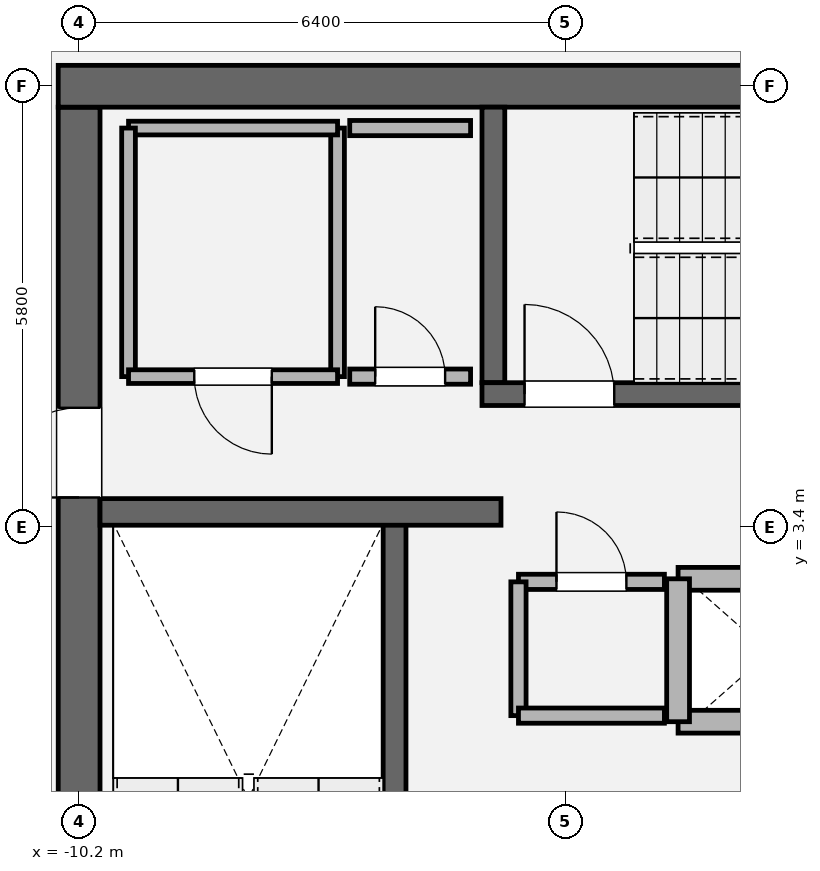
"""IFC4 building model, lengths in metres.
Left out: names, types, materials, properties, quantities, classifications, styles, units other than length and angle.
Written with IfcOpenShell. Run it as: python <this file> out.ifc"""

import sys

from ifc_helpers import new_model, si_unit, direction, frame, frame_2d, origin, place, context, subcontext, project, spatial, rectangle, extrude, element, fill, save


model = new_model("IFC4")
c1 = context("Model", 3, precision=1e-05, world=origin(), true_north=direction((0.0, 1.0)))
c2 = subcontext(c1, "Body", "Model", "MODEL_VIEW")
j1 = project(units=[si_unit("LENGTHUNIT", "METRE"), si_unit("PLANEANGLEUNIT", "RADIAN")], contexts=[c1])
p1 = place(None, origin())
s1 = spatial("IfcSite", under=j1, at=p1, CompositionType="ELEMENT")
p2 = place(p1, origin())
s2 = spatial("IfcBuilding", under=s1, at=p2, CompositionType="ELEMENT")
p3 = place(p2, frame((0.0, 0.0, 271.65)))
s3 = spatial("IfcBuildingStorey", under=s2, at=p3, CompositionType="ELEMENT", Elevation=271.65)
p4 = place(p3, frame((-10.2, -8.925, 0.0), z_axis=(0.0, 0.0, 1.0), x_axis=(0.0, 1.0, 0.0)))
e1 = element("IfcWall", 1, at=p4, inside=s3, PredefinedType="SHEAR", context=c2, shape_type="SweptSolid", body=[
    extrude(rectangle(XDim=17.85, YDim=0.55, at=frame_2d((8.925, 0.0))), origin(), (0.0, 0.0, 1.0), 4.05),
])
p5 = place(p4, frame((12.715, 0.0, 0.0)))
e2 = element("IfcOpeningElement", 2, at=p5, cuts=e1, PredefinedType="OPENING", context=c2, shape_type="SweptSolid", body=[
    extrude(rectangle(XDim=1.18, YDim=2.2, at=frame_2d((0.59, 1.1))), frame((0.0, 0.285, 0.0), z_axis=(0.0, -1.0, 0.0), x_axis=(1.0, 0.0, 0.0)), (0.0, 0.0, 1.0), 0.57),
])
p6 = place(p3, frame((-10.475, 9.2, 0.0), z_axis=(0.0, 0.0, 1.0), x_axis=(1.0, 0.0, 0.0)))
e3 = element("IfcWall", 3, at=p6, inside=s3, PredefinedType="SHEAR", context=c2, shape_type="SweptSolid", body=[
    extrude(rectangle(XDim=20.95, YDim=0.55, at=frame_2d((10.475, 0.0))), origin(), (0.0, 0.0, 1.0), 4.05),
])
p7 = place(p3, frame((-6.05, -5.5, 0.0), z_axis=(0.0, 0.0, 1.0), x_axis=(0.0, 1.0, 0.0)))
e4 = element("IfcWall", 4, at=p7, inside=s3, PredefinedType="SOLIDWALL", context=c2, shape_type="SweptSolid", body=[
    extrude(rectangle(XDim=8.95, YDim=0.3, at=frame_2d((4.475, 0.0))), origin(), (0.0, 0.0, 1.0), 4.05),
])
p8 = place(p3, frame((-4.75, 5.3, 0.0), z_axis=(0.0, 0.0, 1.0), x_axis=(0.0, 1.0, 0.0)))
e5 = element("IfcWall", 5, at=p8, inside=s3, PredefinedType="SOLIDWALL", context=c2, shape_type="SweptSolid", body=[
    extrude(rectangle(XDim=3.625, YDim=0.3, at=frame_2d((1.812, 0.0))), origin(), (0.0, 0.0, 1.0), 4.05),
])
p9 = place(p3, frame((-4.9, 5.15, 0.0), z_axis=(0.0, 0.0, 1.0), x_axis=(1.0, 0.0, 0.0)))
e6 = element("IfcWall", 6, at=p9, inside=s3, PredefinedType="SOLIDWALL", context=c2, shape_type="SweptSolid", body=[
    extrude(rectangle(XDim=9.8, YDim=0.3, at=frame_2d((4.9, 0.0))), origin(), (0.0, 0.0, 1.0), 4.05),
])
p10 = place(p9, frame((0.56, 0.0, 0.0)))
e7 = element("IfcOpeningElement", 7, at=p10, cuts=e6, PredefinedType="OPENING", context=c2, shape_type="SweptSolid", body=[
    extrude(rectangle(XDim=1.18, YDim=2.2, at=frame_2d((0.59, 1.1))), frame((0.0, 0.16, 0.0), z_axis=(0.0, -1.0, 0.0), x_axis=(1.0, 0.0, 0.0)), (0.0, 0.0, 1.0), 0.32),
])
p11 = place(p3, frame((-9.925, 3.6, 0.0), z_axis=(0.0, 0.0, 1.0), x_axis=(1.0, 0.0, 0.0)))
e8 = element("IfcWall", 8, at=p11, inside=s3, PredefinedType="SOLIDWALL", context=c2, shape_type="SweptSolid", body=[
    extrude(rectangle(XDim=5.275, YDim=0.35, at=frame_2d((2.638, 0.0))), origin(), (0.0, 0.0, 1.0), 4.05),
])
for number, where, z_axis, x_axis in (
    (9, (-2.32, 0.84, 0.0), (0.0, 0.0, 1.0), (1.0, 0.0, 0.0)),
    (10, (-2.32, 2.72, 0.0), (0.0, 0.0, 1.0), (1.0, 0.0, 0.0)),
):
    element("IfcWall", number, at=place(p3, frame(where, z_axis=z_axis, x_axis=x_axis)), inside=s3, PredefinedType="SOLIDWALL", context=c2, shape_type="SweptSolid", body=[
        extrude(rectangle(XDim=4.64, YDim=0.3, at=frame_2d((2.32, 0.0))), origin(), (0.0, 0.0, 1.0), 3.85),
    ])
p12 = place(p3, frame((-2.32, 0.84, 0.0), z_axis=(0.0, 0.0, 1.0), x_axis=(0.0, 1.0, 0.0)))
e11 = element("IfcWall", 11, at=p12, inside=s3, PredefinedType="SOLIDWALL", context=c2, shape_type="SweptSolid", body=[
    extrude(rectangle(XDim=1.88, YDim=0.3, at=frame_2d((0.94, 0.0))), origin(), (0.0, 0.0, 1.0), 3.85),
])
p13 = place(p3, frame((-2.5, 2.68, 0.0), z_axis=(0.0, 0.0, 1.0), x_axis=(-1.0, 0.0, 0.0)))
e12 = element("IfcWall", 12, at=p13, inside=s3, PredefinedType="SOLIDWALL", context=c2, shape_type="SweptSolid", body=[
    extrude(rectangle(XDim=1.92, YDim=0.2, at=frame_2d((0.96, 0.0))), origin(), (0.0, 0.0, 1.0), 3.85),
])
p14 = place(p13, frame((0.5, 0.0, 0.0)))
e13 = element("IfcOpeningElement", 13, at=p14, cuts=e12, PredefinedType="OPENING", context=c2, shape_type="SweptSolid", body=[
    extrude(rectangle(XDim=0.92, YDim=2.1, at=frame_2d((0.46, 1.05))), frame((0.0, 0.11, 0.0), z_axis=(0.0, -1.0, 0.0), x_axis=(1.0, 0.0, 0.0)), (0.0, 0.0, 1.0), 0.22),
])
p15 = place(p3, frame((-4.42, 2.68, 0.0), z_axis=(0.0, 0.0, 1.0), x_axis=(0.0, -1.0, 0.0)))
e14 = element("IfcWall", 14, at=p15, inside=s3, PredefinedType="SOLIDWALL", context=c2, shape_type="SweptSolid", body=[
    extrude(rectangle(XDim=1.76, YDim=0.2, at=frame_2d((0.88, 0.0))), origin(), (0.0, 0.0, 1.0), 3.85),
])
p16 = place(p3, frame((-4.42, 0.92, 0.0), z_axis=(0.0, 0.0, 1.0), x_axis=(1.0, 0.0, 0.0)))
e15 = element("IfcWall", 15, at=p16, inside=s3, PredefinedType="SOLIDWALL", context=c2, shape_type="SweptSolid", body=[
    extrude(rectangle(XDim=1.92, YDim=0.2, at=frame_2d((0.96, 0.0))), origin(), (0.0, 0.0, 1.0), 3.85),
])
p17 = place(p3, frame((-6.8, 5.38, 0.0), z_axis=(0.0, 0.0, 1.0), x_axis=(0.0, 1.0, 0.0)))
e16 = element("IfcWall", 16, at=p17, inside=s3, PredefinedType="PARTITIONING", context=c2, shape_type="SweptSolid", body=[
    extrude(rectangle(XDim=3.27, YDim=0.18, at=frame_2d((1.635, 0.0))), origin(), (0.0, 0.0, 1.0), 3.85),
])
p18 = place(p3, frame((-6.8, 8.65, 0.0), z_axis=(0.0, 0.0, 1.0), x_axis=(-1.0, 0.0, 0.0)))
e17 = element("IfcWall", 17, at=p18, inside=s3, PredefinedType="PARTITIONING", context=c2, shape_type="SweptSolid", body=[
    extrude(rectangle(XDim=2.75, YDim=0.18, at=frame_2d((1.375, 0.0))), origin(), (0.0, 0.0, 1.0), 3.85),
])
p19 = place(p3, frame((-9.55, 8.65, 0.0), z_axis=(0.0, 0.0, 1.0), x_axis=(0.0, -1.0, 0.0)))
e18 = element("IfcWall", 18, at=p19, inside=s3, PredefinedType="PARTITIONING", context=c2, shape_type="SweptSolid", body=[
    extrude(rectangle(XDim=3.27, YDim=0.18, at=frame_2d((1.635, 0.0))), origin(), (0.0, 0.0, 1.0), 3.85),
])
p20 = place(p3, frame((-9.55, 5.38, 0.0), z_axis=(0.0, 0.0, 1.0), x_axis=(1.0, 0.0, 0.0)))
e19 = element("IfcWall", 19, at=p20, inside=s3, PredefinedType="PARTITIONING", context=c2, shape_type="SweptSolid", body=[
    extrude(rectangle(XDim=2.75, YDim=0.18, at=frame_2d((1.375, 0.0))), origin(), (0.0, 0.0, 1.0), 3.85),
])
p21 = place(p20, frame((0.865, 0.0, 0.0)))
e20 = element("IfcOpeningElement", 20, at=p21, cuts=e19, PredefinedType="OPENING", context=c2, shape_type="SweptSolid", body=[
    extrude(rectangle(XDim=1.02, YDim=2.2, at=frame_2d((0.51, 1.1))), frame((0.0, 0.1, 0.0), z_axis=(0.0, -1.0, 0.0), x_axis=(1.0, 0.0, 0.0)), (0.0, 0.0, 1.0), 0.2),
])
p22 = place(p3, frame((-5.05, 8.65, 0.0), z_axis=(0.0, 0.0, 1.0), x_axis=(-1.0, 0.0, 0.0)))
e21 = element("IfcWall", 21, at=p22, inside=s3, PredefinedType="SOLIDWALL", context=c2, shape_type="SweptSolid", body=[
    extrude(rectangle(XDim=1.59, YDim=0.2, at=frame_2d((0.795, 0.0))), origin(), (0.0, 0.0, 1.0), 3.85),
])
p23 = place(p3, frame((-6.64, 5.38, 0.0), z_axis=(0.0, 0.0, 1.0), x_axis=(1.0, 0.0, 0.0)))
e22 = element("IfcWall", 22, at=p23, inside=s3, PredefinedType="SOLIDWALL", context=c2, shape_type="SweptSolid", body=[
    extrude(rectangle(XDim=1.59, YDim=0.2, at=frame_2d((0.795, 0.0))), origin(), (0.0, 0.0, 1.0), 3.85),
])
p24 = place(p23, frame((0.335, 0.0, 0.0)))
e23 = element("IfcOpeningElement", 23, at=p24, cuts=e22, PredefinedType="OPENING", context=c2, shape_type="SweptSolid", body=[
    extrude(rectangle(XDim=0.92, YDim=2.1, at=frame_2d((0.46, 1.05))), frame((0.0, 0.11, 0.0), z_axis=(0.0, -1.0, 0.0), x_axis=(1.0, 0.0, 0.0)), (0.0, 0.0, 1.0), 0.22),
])
p25 = place(p10, origin())
e24 = element("IfcDoor", 24, at=p25, inside=s3, OperationType="SINGLE_SWING_LEFT", PredefinedType="DOOR", context=c2, shape_type="SweptSolid", body=[
    extrude(rectangle(XDim=1.18, YDim=2.2, at=frame_2d((0.59, 1.1))), frame((0.0, 0.025, 0.0), z_axis=(0.0, -1.0, 0.0), x_axis=(1.0, 0.0, 0.0)), (0.0, 0.0, 1.0), 0.05),
])
fill(e7, e24)
p26 = place(p5, origin())
e25 = element("IfcDoor", 25, at=p26, inside=s3, OperationType="SINGLE_SWING_LEFT", PredefinedType="DOOR", context=c2, shape_type="SweptSolid", body=[
    extrude(rectangle(XDim=1.18, YDim=2.2, at=frame_2d((0.59, 1.1))), frame((0.0, 0.025, 0.0), z_axis=(0.0, -1.0, 0.0), x_axis=(1.0, 0.0, 0.0)), (0.0, 0.0, 1.0), 0.05),
])
fill(e2, e25)
p27 = place(p14, origin())
e26 = element("IfcDoor", 26, at=p27, inside=s3, OperationType="SINGLE_SWING_RIGHT", PredefinedType="DOOR", context=c2, shape_type="SweptSolid", body=[
    extrude(rectangle(XDim=0.92, YDim=2.1, at=frame_2d((0.46, 1.05))), frame((0.0, 0.025, 0.0), z_axis=(0.0, -1.0, 0.0), x_axis=(1.0, 0.0, 0.0)), (0.0, 0.0, 1.0), 0.05),
])
fill(e13, e26)
p28 = place(p21, origin())
e27 = element("IfcDoor", 27, at=p28, inside=s3, OperationType="SINGLE_SWING_RIGHT", PredefinedType="DOOR", context=c2, shape_type="SweptSolid", body=[
    extrude(rectangle(XDim=1.02, YDim=2.2, at=frame_2d((0.51, 1.1))), frame((0.0, 0.025, 0.0), z_axis=(0.0, -1.0, 0.0), x_axis=(1.0, 0.0, 0.0)), (0.0, 0.0, 1.0), 0.05),
])
fill(e20, e27)
p29 = place(p24, origin())
e28 = element("IfcDoor", 28, at=p29, inside=s3, OperationType="SINGLE_SWING_LEFT", PredefinedType="DOOR", context=c2, shape_type="SweptSolid", body=[
    extrude(rectangle(XDim=0.92, YDim=2.1, at=frame_2d((0.46, 1.05))), frame((0.0, 0.025, 0.0), z_axis=(0.0, -1.0, 0.0), x_axis=(1.0, 0.0, 0.0)), (0.0, 0.0, 1.0), 0.05),
])
fill(e23, e28)
save(model, sys.argv[1])
